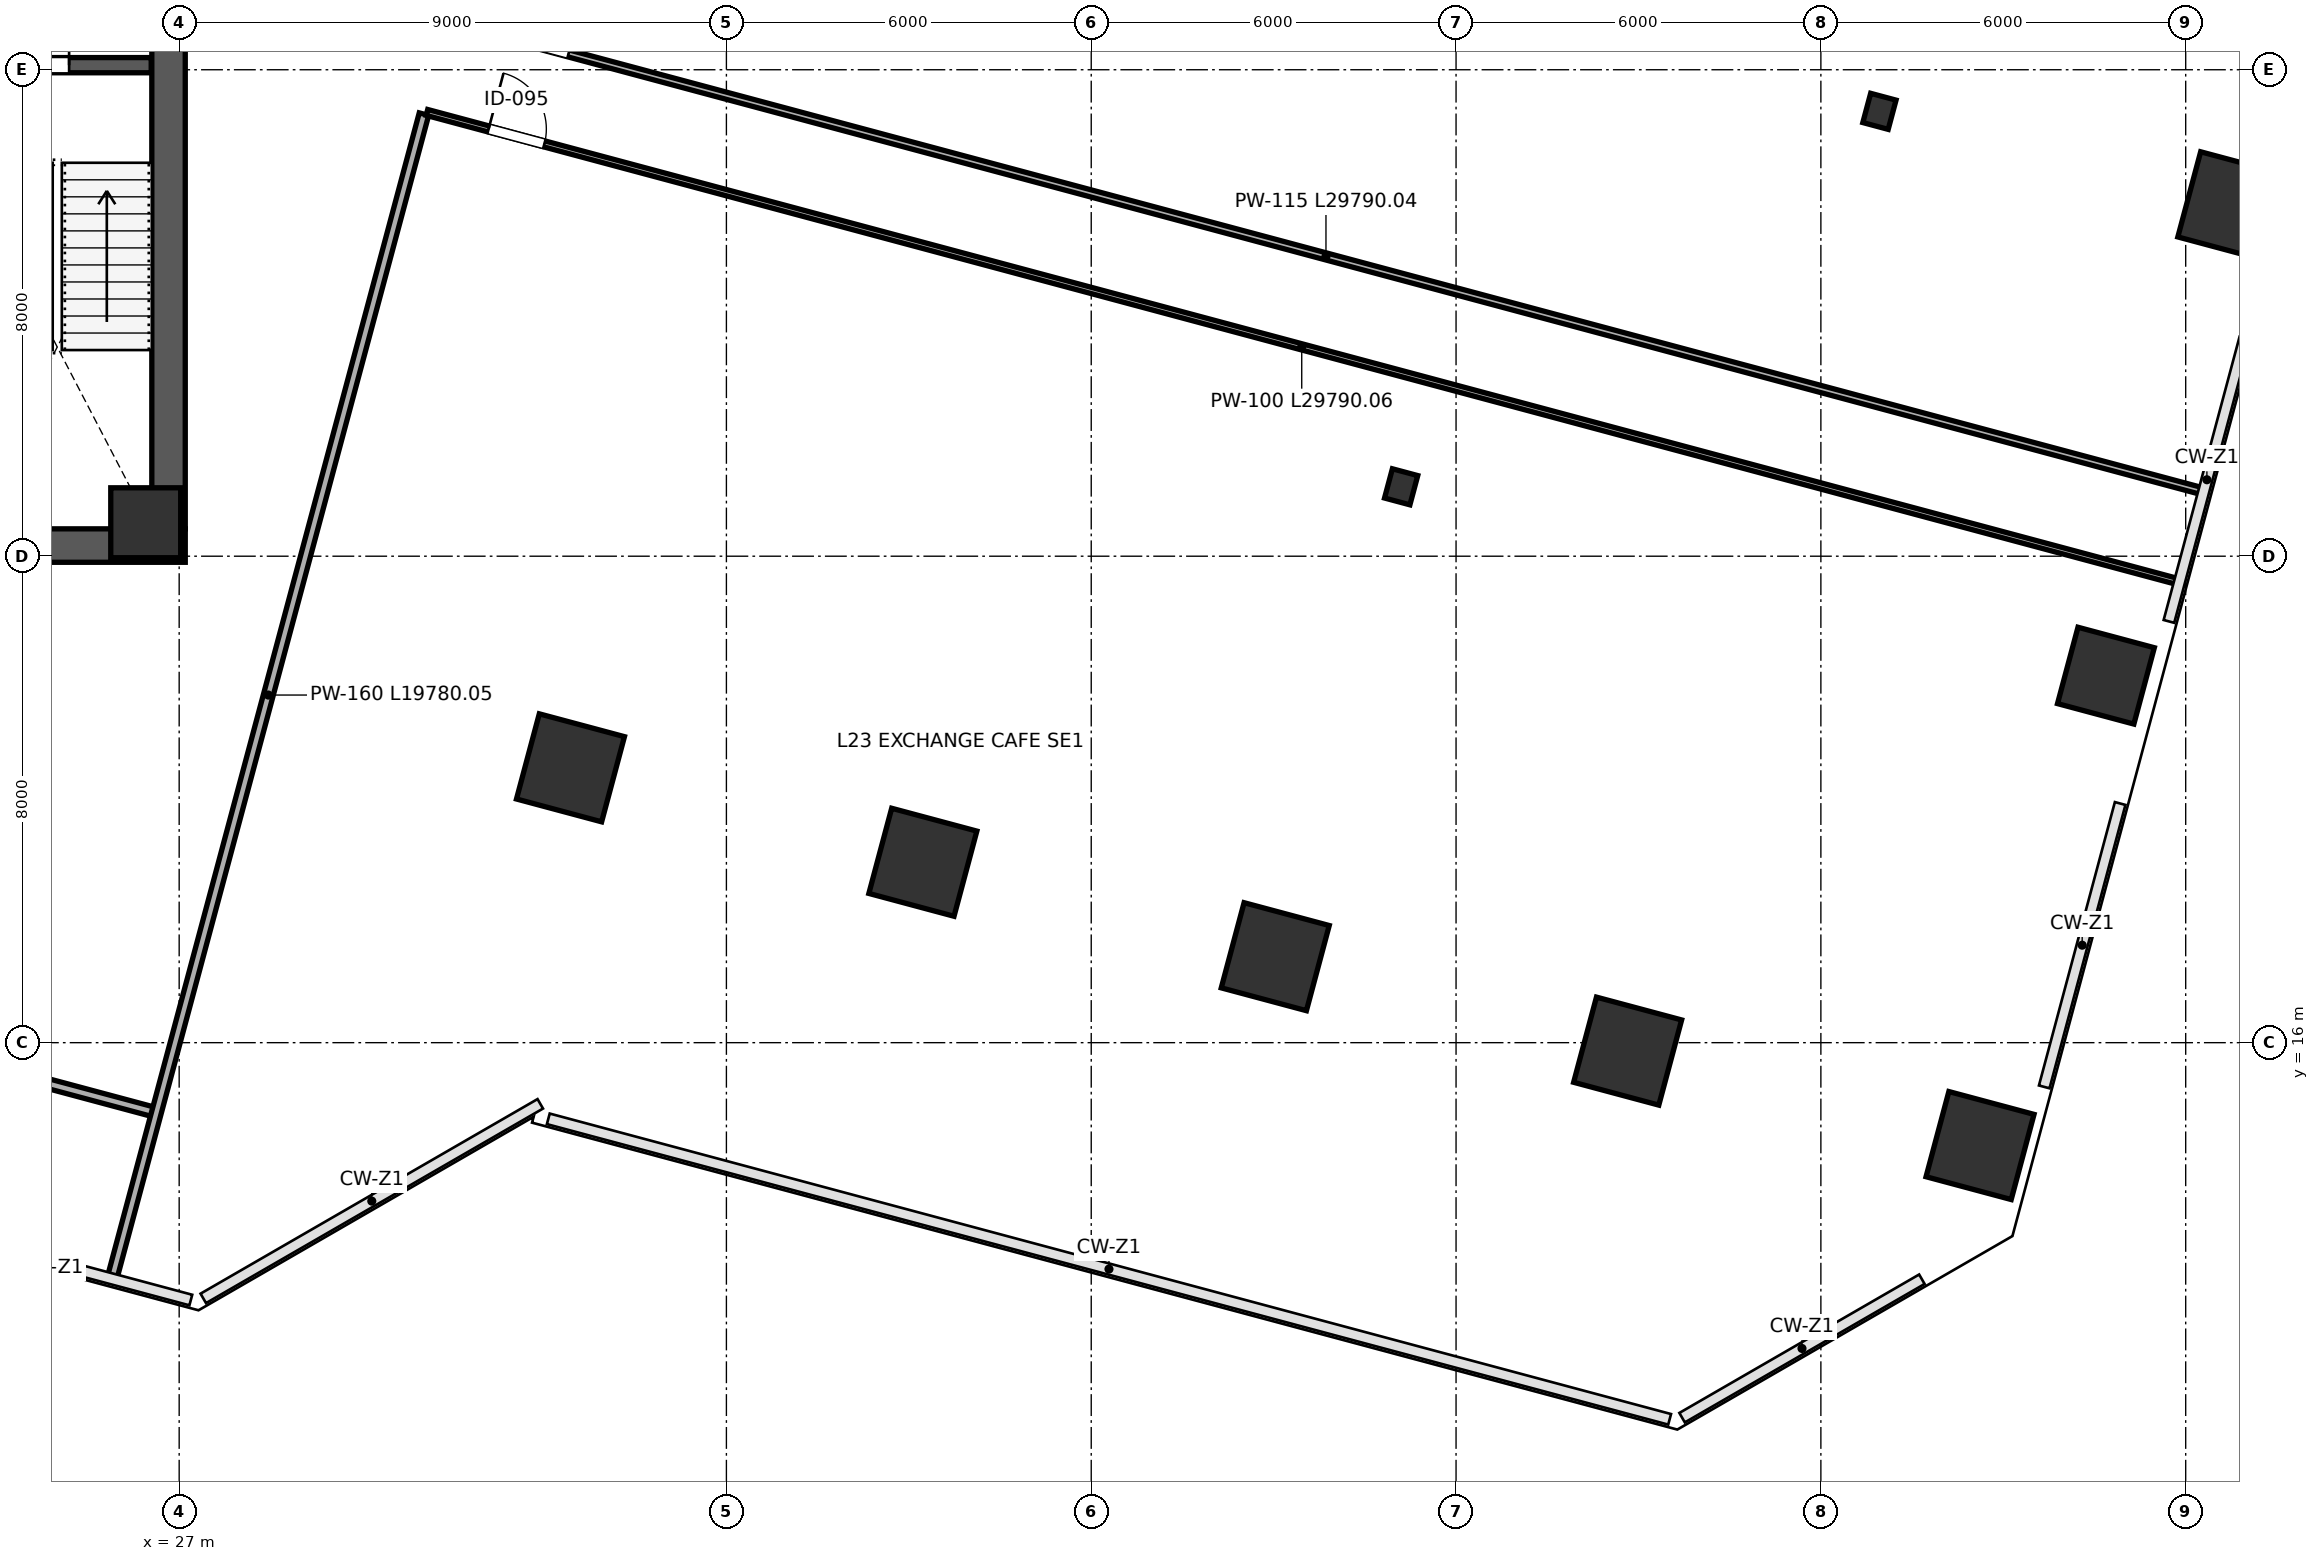
"""IFC4 building model, lengths in metres.
Left out: names, types, materials, properties, quantities, classifications, styles, units other than length and angle.
Written with IfcOpenShell. Run it as: python <this file> out.ifc"""

import sys

from ifc_helpers import new_model, si_unit, direction, frame, frame_2d, origin, origin_2d, place, context, subcontext, project, spatial, rectangle, i_section, extrude, clip, halfspace, source, transform, mapped, element, fill, save


model = new_model("IFC4")
c1 = context("Model", 3, precision=1e-05, world=origin(), true_north=direction((0.0, 1.0)))
c2 = subcontext(c1, "Body", "Model", "MODEL_VIEW")
j1 = project(units=[si_unit("LENGTHUNIT", "METRE"), si_unit("PLANEANGLEUNIT", "RADIAN")], contexts=[c1])
p1 = place(None, origin())
s1 = spatial("IfcSite", under=j1, at=p1, CompositionType="ELEMENT")
p2 = place(p1, origin())
s2 = spatial("IfcBuilding", under=s1, at=p2, CompositionType="ELEMENT")
p3 = place(p2, frame((0.0, 0.0, 104.2)))
s3 = spatial("IfcBuildingStorey", under=s2, at=p3, CompositionType="ELEMENT", Elevation=104.2)
m1 = source(origin(), c2, "Body", "SweptSolid", [
    extrude(rectangle(XDim=1.15, YDim=1.15, at=origin_2d()), origin(), (0.0, 0.0, 1.0), 4.198),
])
p4 = place(p3, frame((26.45, 24.55, 0.001), z_axis=(0.0, 0.0, 1.0), x_axis=(1.0, 0.0, 0.0)))
e1 = element("IfcColumn", 1, at=p4, inside=s3, PredefinedType="COLUMN", context=c2, shape_type="MappedRepresentation", body=[
    mapped(m1, transform((0.0, 0.0, 0.0), scale=1.0)),
])
p5 = place(p3, frame((33.435, 20.52, 0.0), z_axis=(-0.060058537002, -0.06110101884, 0.996323058867), x_axis=(-0.508099790771, 0.861012712784, 0.022174558447)))
e2 = element("IfcColumn", 2, at=p5, inside=s3, PredefinedType="COLUMN", context=c2, shape_type="Clipping", body=[
    clip(clip(extrude(rectangle(XDim=1.45, YDim=1.45, at=origin_2d()), origin(), (0.0, 0.0, 1.0), 4.215), halfspace(frame((0.0, 0.0, 0.077), z_axis=(0.0, 0.0, -1.0), x_axis=(1.0, 0.0, 0.0)), False)), halfspace(frame((0.0, 0.0, 4.138), z_axis=(0.0, 0.0, 1.0), x_axis=(1.0, 0.0, 0.0)), False)),
])
p6 = place(p3, frame((39.231, 18.967, 0.0), z_axis=(-0.068264249605, -0.090787986784, 0.993527822299), x_axis=(-0.617495616546, 0.786024721105, 0.029399002663)))
e3 = element("IfcColumn", 3, at=p6, inside=s3, PredefinedType="COLUMN", context=c2, shape_type="Clipping", body=[
    clip(clip(extrude(rectangle(XDim=1.45, YDim=1.45, at=origin_2d()), origin(), (0.0, 0.0, 1.0), 4.227), halfspace(frame((0.0, 0.0, 0.102), z_axis=(0.0, 0.0, -1.0), x_axis=(1.0, 0.0, 0.0)), False)), halfspace(frame((0.0, 0.0, 4.125), z_axis=(0.0, 0.0, 1.0), x_axis=(1.0, 0.0, 0.0)), False)),
])
p7 = place(p3, frame((45.027, 17.414, 0.0), z_axis=(-0.076352194351, -0.120138192769, 0.989816729024), x_axis=(-0.677808462842, 0.734314874287, 0.036842273285)))
e4 = element("IfcColumn", 4, at=p7, inside=s3, PredefinedType="COLUMN", context=c2, shape_type="Clipping", body=[
    clip(clip(extrude(rectangle(XDim=1.45, YDim=1.45, at=origin_2d()), origin(), (0.0, 0.0, 1.0), 4.243), halfspace(frame((0.0, 0.0, 0.128), z_axis=(0.0, 0.0, -1.0), x_axis=(1.0, 0.0, 0.0)), False)), halfspace(frame((0.0, 0.0, 4.115), z_axis=(0.0, 0.0, 1.0), x_axis=(1.0, 0.0, 0.0)), False)),
])
p8 = place(p3, frame((47.097, 25.141, 0.0), z_axis=(-0.036682452991, -0.131354278291, 0.990656575821), x_axis=(-0.861364861032, 0.506758959131, 0.035297783485)))
e5 = element("IfcColumn", 5, at=p8, inside=s3, PredefinedType="COLUMN", context=c2, shape_type="Clipping", body=[
    clip(clip(extrude(i_section(OverallWidth=0.432, OverallDepth=0.498, WebThickness=0.056, FlangeThickness=0.089, FilletRadius=0.015, at=origin_2d()), origin(), (0.0, 0.0, 1.0), 4.24), halfspace(frame((0.0, 0.0, 0.042), z_axis=(0.0, 0.0, -1.0), x_axis=(1.0, 0.0, 0.0)), False)), halfspace(frame((0.0, 0.0, 4.198), z_axis=(0.0, 0.0, 1.0), x_axis=(1.0, 0.0, 0.0)), False)),
])
p9 = place(p3, frame((49.167, 32.869, 0.0), z_axis=(0.002934421261, -0.142290662346, 0.989820567871), x_axis=(-0.971002586925, 0.236214165868, 0.036835363839)))
e6 = element("IfcColumn", 6, at=p9, inside=s3, PredefinedType="COLUMN", context=c2, shape_type="Clipping", body=[
    clip(clip(extrude(i_section(OverallWidth=0.432, OverallDepth=0.498, WebThickness=0.056, FlangeThickness=0.089, FilletRadius=0.015, at=origin_2d()), origin(), (0.0, 0.0, 1.0), 4.243), halfspace(frame((0.0, 0.0, 0.043), z_axis=(0.0, 0.0, -1.0), x_axis=(1.0, 0.0, 0.0)), False)), halfspace(frame((0.0, 0.0, 4.2), z_axis=(0.0, 0.0, 1.0), x_axis=(1.0, 0.0, 0.0)), False)),
])
p10 = place(p3, frame((50.822, 15.861, 0.0), z_axis=(-0.084243983137, -0.149188019084, 0.985213624686), x_axis=(-0.71571068798, 0.696987703151, 0.044343576393)))
e7 = element("IfcColumn", 7, at=p10, inside=s3, PredefinedType="COLUMN", context=c2, shape_type="Clipping", body=[
    clip(clip(extrude(rectangle(XDim=1.45, YDim=1.45, at=origin_2d()), origin(), (0.0, 0.0, 1.0), 4.263), halfspace(frame((0.0, 0.0, 0.155), z_axis=(0.0, 0.0, -1.0), x_axis=(1.0, 0.0, 0.0)), False)), halfspace(frame((0.0, 0.0, 4.108), z_axis=(0.0, 0.0, 1.0), x_axis=(1.0, 0.0, 0.0)), False)),
])
p11 = place(p3, frame((54.963, 31.316, 0.0), z_axis=(-0.005383376269, -0.171237181336, 0.985215127263), x_axis=(-0.957436314569, 0.285218423509, 0.044341340041)))
e8 = element("IfcColumn", 8, at=p11, inside=s3, PredefinedType="COLUMN", context=c2, shape_type="Clipping", body=[
    clip(clip(extrude(i_section(OverallWidth=0.432, OverallDepth=0.498, WebThickness=0.056, FlangeThickness=0.089, FilletRadius=0.015, at=origin_2d()), origin(), (0.0, 0.0, 1.0), 4.263), halfspace(frame((0.0, 0.0, 0.052), z_axis=(0.0, 0.0, -1.0), x_axis=(1.0, 0.0, 0.0)), False)), halfspace(frame((0.0, 0.0, 4.211), z_axis=(0.0, 0.0, 1.0), x_axis=(1.0, 0.0, 0.0)), False)),
])
p12 = place(p3, frame((56.618, 14.308, 0.0), z_axis=(-0.091979563924, -0.1777512192, 0.979767453988), x_axis=(-0.74133412951, 0.66913412922, 0.051799860381)))
e9 = element("IfcColumn", 9, at=p12, inside=s3, PredefinedType="COLUMN", context=c2, shape_type="Clipping", body=[
    clip(clip(extrude(rectangle(XDim=1.45, YDim=1.45, at=origin_2d()), origin(), (0.0, 0.0, 1.0), 4.287), halfspace(frame((0.0, 0.0, 0.182), z_axis=(0.0, 0.0, -1.0), x_axis=(1.0, 0.0, 0.0)), False)), halfspace(frame((0.0, 0.0, 4.104), z_axis=(0.0, 0.0, 1.0), x_axis=(1.0, 0.0, 0.0)), False)),
])
p13 = place(p3, frame((58.688, 22.035, 0.0), z_axis=(-0.05278288811, -0.188844177439, 0.980587499089), x_axis=(-0.861952840318, 0.504442031297, 0.0507497599)))
e10 = element("IfcColumn", 10, at=p13, inside=s3, PredefinedType="COLUMN", context=c2, shape_type="Clipping", body=[
    clip(clip(extrude(rectangle(XDim=1.3, YDim=1.3, at=origin_2d()), origin(), (0.0, 0.0, 1.0), 4.283), halfspace(frame((0.0, 0.0, 0.16), z_axis=(0.0, 0.0, -1.0), x_axis=(1.0, 0.0, 0.0)), False)), halfspace(frame((0.0, 0.0, 4.123), z_axis=(0.0, 0.0, 1.0), x_axis=(1.0, 0.0, 0.0)), False)),
])
p14 = place(p3, frame((60.759, 29.763, 0.0), z_axis=(-0.013554887194, -0.199678296222, 0.979767749546), x_axis=(-0.946533328011, 0.31842027609, 0.051799485898)))
e11 = element("IfcColumn", 11, at=p14, inside=s3, PredefinedType="COLUMN", context=c2, shape_type="Clipping", body=[
    clip(clip(extrude(rectangle(XDim=1.45, YDim=1.45, at=origin_2d()), origin(), (0.0, 0.0, 1.0), 4.287), halfspace(frame((0.0, 0.0, 0.182), z_axis=(0.0, 0.0, -1.0), x_axis=(1.0, 0.0, 0.0)), False)), halfspace(frame((0.0, 0.0, 4.104), z_axis=(0.0, 0.0, 1.0), x_axis=(1.0, 0.0, 0.0)), False)),
])
p15 = place(p3, frame((26.825, 24.45, 0.0), z_axis=(0.0, 0.0, 1.0), x_axis=(0.0, 1.0, 0.0)))
e12 = element("IfcWall", 12, at=p15, inside=s3, PredefinedType="SHEAR", context=c2, shape_type="SweptSolid", body=[
    extrude(rectangle(XDim=15.1, YDim=0.55, at=frame_2d((7.55, 0.0))), origin(), (0.0, 0.0, 1.0), 3.96),
])
p16 = place(p15, frame((8.6, 0.0, 0.0)))
e13 = element("IfcOpeningElement", 13, at=p16, cuts=e12, PredefinedType="OPENING", context=c2, shape_type="SweptSolid", body=[
    extrude(rectangle(XDim=1.15, YDim=2.2, at=frame_2d((0.575, 1.1))), frame((0.0, 0.285, 0.0), z_axis=(0.0, -1.0, 0.0), x_axis=(1.0, 0.0, 0.0)), (0.0, 0.0, 1.0), 0.57),
])
p17 = place(p3, frame((8.9, 24.175, 0.0), z_axis=(0.0, 0.0, 1.0), x_axis=(1.0, 0.0, 0.0)))
e14 = element("IfcWall", 14, at=p17, inside=s3, PredefinedType="SHEAR", context=c2, shape_type="SweptSolid", body=[
    extrude(rectangle(XDim=18.2, YDim=0.55, at=frame_2d((9.1, 0.0))), origin(), (0.0, 0.0, 1.0), 3.96),
])
p18 = place(p3, frame((23.19, 32.075, 0.0), z_axis=(0.0, 0.0, 1.0), x_axis=(1.0, 0.0, 0.0)))
e15 = element("IfcWall", 15, at=p18, inside=s3, PredefinedType="SHEAR", context=c2, shape_type="SweptSolid", body=[
    extrude(rectangle(XDim=3.35, YDim=0.25, at=frame_2d((1.675, 0.0))), origin(), (0.0, 0.0, 1.0), 3.96),
])
p19 = place(p18, frame((0.85, 0.0, 0.0)))
e16 = element("IfcOpeningElement", 16, at=p19, cuts=e15, PredefinedType="OPENING", context=c2, shape_type="SweptSolid", body=[
    extrude(rectangle(XDim=1.15, YDim=2.2, at=frame_2d((0.575, 1.1))), frame((0.0, 0.135, 0.0), z_axis=(0.0, -1.0, 0.0), x_axis=(1.0, 0.0, 0.0)), (0.0, 0.0, 1.0), 0.27),
])
p20 = place(p3, frame((8.563, 19.689, 0.0), z_axis=(0.0, 0.0, 1.0), x_axis=(0.965928721089, -0.258808241319, 0.0)))
e17 = element("IfcWall", 17, at=p20, inside=s3, PredefinedType="PARTITIONING", context=c2, shape_type="SweptSolid", body=[
    extrude(rectangle(XDim=18.66, YDim=0.16, at=frame_2d((9.33, 0.0))), origin(), (0.0, 0.0, 1.0), 3.96),
])
p21 = place(p20, frame((1.45, 0.0, 0.0)))
e18 = element("IfcOpeningElement", 18, at=p21, cuts=e17, PredefinedType="OPENING", context=c2, shape_type="SweptSolid", body=[
    extrude(rectangle(XDim=0.95, YDim=2.15, at=frame_2d((0.475, 1.075))), frame((0.0, 0.09, 0.0), z_axis=(0.0, -1.0, 0.0), x_axis=(1.0, 0.0, 0.0)), (0.0, 0.0, 1.0), 0.18),
])
p22 = place(p3, frame((25.906, 12.164, 0.0), z_axis=(0.0, 0.0, 1.0), x_axis=(0.258805595447, 0.965929430013, 0.0)))
e19 = element("IfcWall", 19, at=p22, inside=s3, PredefinedType="PARTITIONING", context=c2, shape_type="SweptSolid", body=[
    extrude(rectangle(XDim=19.78, YDim=0.16, at=frame_2d((9.89, 0.0))), origin(), (0.0, 0.0, 1.0), 3.96),
])
p23 = place(p3, frame((31.473, 32.785, 0.0), z_axis=(0.0, 0.0, 1.0), x_axis=(0.965927931901, -0.258811186722, 0.0)))
e20 = element("IfcWall", 20, at=p23, inside=s3, PredefinedType="PARTITIONING", context=c2, shape_type="SweptSolid", body=[
    extrude(rectangle(XDim=29.79, YDim=0.115, at=frame_2d((14.895, 0.0))), origin(), (0.0, 0.0, 1.0), 3.095),
])
p24 = place(p23, frame((1.05, 0.0, 0.0)))
e21 = element("IfcOpeningElement", 21, at=p24, cuts=e20, PredefinedType="OPENING", context=c2, shape_type="SweptSolid", body=[
    extrude(rectangle(XDim=0.95, YDim=2.15, at=frame_2d((0.475, 1.075))), frame((0.0, 0.067, 0.0), z_axis=(0.0, -1.0, 0.0), x_axis=(1.0, 0.0, 0.0)), (0.0, 0.0, 1.0), 0.135),
])
p25 = place(p3, frame((31.074, 31.298, 0.0), z_axis=(0.0, 0.0, 1.0), x_axis=(0.96592643206, -0.258816784325, 0.0)))
e22 = element("IfcWall", 22, at=p25, inside=s3, PredefinedType="PARTITIONING", context=c2, shape_type="SweptSolid", body=[
    extrude(rectangle(XDim=29.79, YDim=0.1, at=frame_2d((14.895, 0.0))), origin(), (0.0, 0.0, 1.0), 3.095),
])
p26 = place(p25, frame((1.05, 0.0, 0.0)))
e23 = element("IfcOpeningElement", 23, at=p26, cuts=e22, PredefinedType="OPENING", context=c2, shape_type="SweptSolid", body=[
    extrude(rectangle(XDim=0.95, YDim=2.15, at=frame_2d((0.475, 1.075))), frame((0.0, 0.06, 0.0), z_axis=(0.0, -1.0, 0.0), x_axis=(1.0, 0.0, 0.0)), (0.0, 0.0, 1.0), 0.12),
])
m2 = source(origin(), c2, "Body", "SweptSolid", [
    extrude(rectangle(XDim=1.15, YDim=2.2, at=frame_2d((0.575, 1.1))), frame((0.0, 0.025, 0.0), z_axis=(0.0, -1.0, 0.0), x_axis=(1.0, 0.0, 0.0)), (0.0, 0.0, 1.0), 0.05),
])
p27 = place(p19, origin())
e24 = element("IfcDoor", 24, at=p27, inside=s3, OperationType="SINGLE_SWING_RIGHT", PredefinedType="DOOR", context=c2, shape_type="MappedRepresentation", body=[
    mapped(m2, transform((0.0, 0.0, 0.0), scale=1.0)),
])
fill(e16, e24)
m3 = source(origin(), c2, "Body", "SweptSolid", [
    extrude(rectangle(XDim=0.95, YDim=2.15, at=frame_2d((0.475, 1.075))), frame((0.0, 0.025, 0.0), z_axis=(0.0, -1.0, 0.0), x_axis=(1.0, 0.0, 0.0)), (0.0, 0.0, 1.0), 0.05),
])
p28 = place(p24, origin())
e25 = element("IfcDoor", 25, at=p28, inside=s3, OperationType="SINGLE_SWING_LEFT", PredefinedType="DOOR", context=c2, shape_type="MappedRepresentation", body=[
    mapped(m3, transform((0.0, 0.0, 0.0), scale=1.0)),
])
fill(e21, e25)
p29 = place(p26, origin())
e26 = element("IfcDoor", 26, at=p29, inside=s3, OperationType="SINGLE_SWING_LEFT", PredefinedType="DOOR", context=c2, shape_type="MappedRepresentation", body=[
    mapped(m3, transform((0.0, 0.0, 0.0), scale=1.0)),
])
fill(e23, e26)
save(model, sys.argv[1])
